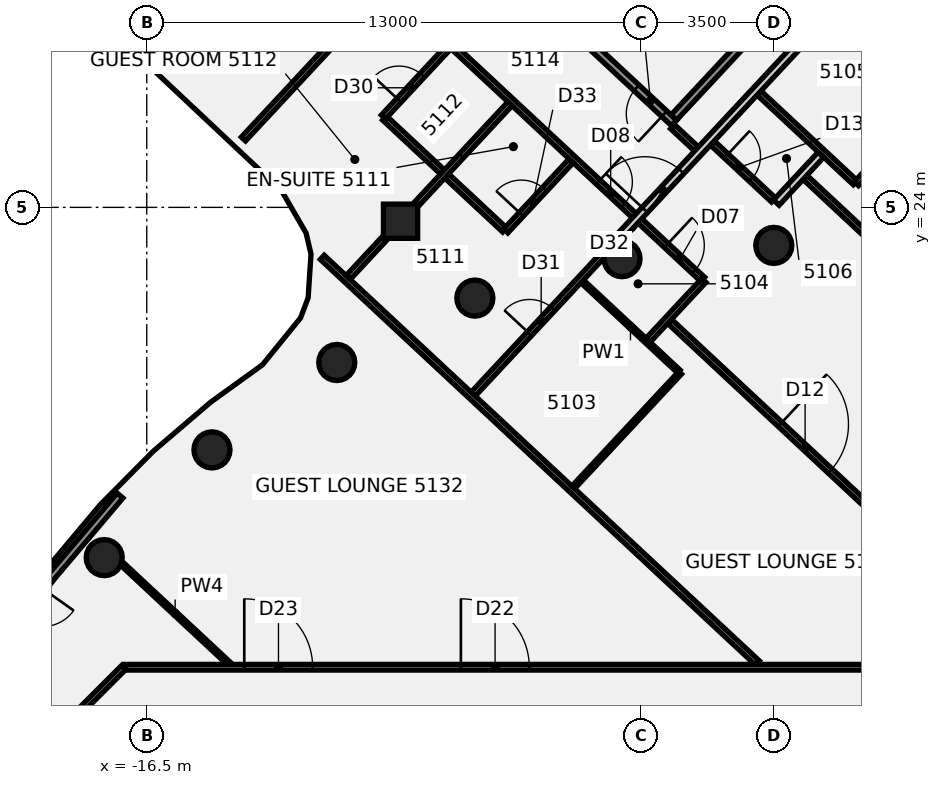
"""IFC4 building model, lengths in metres.
Left out: names, types, materials, properties, quantities, classifications, styles, units other than length and angle.
Written with IfcOpenShell. Run it as: python <this file> out.ifc"""

import sys

from ifc_helpers import new_model, si_unit, direction, frame, frame_2d, origin, origin_2d, place, context, subcontext, project, spatial, rectangle, circle, extrude, element, fill, save


model = new_model("IFC4")
c1 = context("Model", 3, precision=1e-05, world=origin(), true_north=direction((0.0, 1.0)))
c2 = subcontext(c1, "Body", "Model", "MODEL_VIEW")
j1 = project(units=[si_unit("LENGTHUNIT", "METRE"), si_unit("PLANEANGLEUNIT", "RADIAN")], contexts=[c1])
p1 = place(None, origin())
s1 = spatial("IfcSite", under=j1, at=p1, CompositionType="ELEMENT")
p2 = place(p1, origin())
s2 = spatial("IfcBuilding", under=s1, at=p2, CompositionType="ELEMENT")
p3 = place(p2, frame((0.0, 0.0, 204.1)))
s3 = spatial("IfcBuildingStorey", under=s2, at=p3, CompositionType="ELEMENT", Elevation=204.1)
for number, where, z_axis, x_axis in (
    (1, (0.0, 23.0, -0.14), (0.0, 0.0, 1.0), (1.0, 0.0, 0.0)),
    (2, (-3.994, 22.651, -0.14), (0.0, 0.0, 1.0), (1.0, 0.0, 0.0)),
    (3, (-7.866, 21.613, -0.14), (0.0, 0.0, 1.0), (1.0, 0.0, 0.0)),
    (4, (-11.5, 19.919, -0.14), (0.0, 0.0, 1.0), (1.0, 0.0, 0.0)),
    (5, (-14.784, 17.619, -0.14), (0.0, 0.0, 1.0), (1.0, 0.0, 0.0)),
    (6, (-17.619, 14.784, -0.14), (0.0, 0.0, 1.0), (1.0, 0.0, 0.0)),
):
    element("IfcColumn", number, at=place(p3, frame(where, z_axis=z_axis, x_axis=x_axis)), inside=s3, PredefinedType="COLUMN", context=c2, shape_type="SweptSolid", body=[
        extrude(circle(Radius=0.475, at=origin_2d()), origin(), (0.0, 0.0, 1.0), 3.6),
    ])
p4 = place(p3, frame((-9.822, 23.635, -0.139), z_axis=(-0.00779464519, -0.049750170171, 0.998731277208), x_axis=(0.681290927814, 0.730822792245, 0.041721912875)))
e7 = element("IfcColumn", 7, at=p4, inside=s3, PredefinedType="COLUMN", context=c2, shape_type="SweptSolid", body=[
    extrude(rectangle(XDim=0.9, YDim=0.9, at=origin_2d()), origin(), (0.0, 0.0, 1.0), 3.602),
])
p5 = place(p3, frame((-17.173, 14.639, 0.0), z_axis=(0.0, 0.0, 1.0), x_axis=(0.731508874243, -0.681831919833, 0.0)))
e8 = element("IfcWall", 8, at=p5, inside=s3, PredefinedType="PARTITIONING", context=c2, shape_type="SweptSolid", body=[
    extrude(rectangle(XDim=3.883, YDim=0.1, at=frame_2d((1.941, 0.0))), origin(), (0.0, 0.0, 1.0), 2.864),
])
p6 = place(p3, frame((-11.882, 22.685, 0.0), z_axis=(0.0, 0.0, 1.0), x_axis=(0.731545196646, -0.681792948969, 0.0)))
e9 = element("IfcWall", 9, at=p6, inside=s3, PredefinedType="PARTITIONING", context=c2, shape_type="SweptSolid", body=[
    extrude(rectangle(XDim=15.654, YDim=0.15, at=frame_2d((7.827, 0.0))), origin(), (0.0, 0.0, 1.0), 2.864),
])
p7 = place(p3, frame((-10.243, 26.352, 0.0), z_axis=(0.0, 0.0, 1.0), x_axis=(0.731425369859, -0.681921497187, 0.0)))
e10 = element("IfcWall", 10, at=p7, inside=s3, PredefinedType="PARTITIONING", context=c2, shape_type="SweptSolid", body=[
    extrude(rectangle(XDim=4.32, YDim=0.15, at=frame_2d((2.16, 0.0))), origin(), (0.0, 0.0, 1.0), 2.864),
])
p8 = place(p3, frame((-10.124, 29.794, 0.0), z_axis=(0.0, 0.0, 1.0), x_axis=(0.7316631589, -0.681666356738, 0.0)))
e11 = element("IfcWall", 11, at=p8, inside=s3, PredefinedType="PARTITIONING", context=c2, shape_type="SweptSolid", body=[
    extrude(rectangle(XDim=11.28, YDim=0.15, at=frame_2d((5.64, 0.0))), origin(), (0.0, 0.0, 1.0), 2.864),
])
p9 = place(p8, frame((9.97, 0.0, 0.0)))
e12 = element("IfcOpeningElement", 12, at=p9, cuts=e11, PredefinedType="OPENING", context=c2, shape_type="SweptSolid", body=[
    extrude(rectangle(XDim=1.0, YDim=2.1, at=frame_2d((0.5, 1.05))), frame((0.0, 0.085, 0.0), z_axis=(0.0, -1.0, 0.0), x_axis=(1.0, 0.0, 0.0)), (0.0, 0.0, 1.0), 0.17),
])
p10 = place(p8, frame((7.52, 0.0, 0.0)))
e13 = element("IfcOpeningElement", 13, at=p10, cuts=e11, PredefinedType="OPENING", context=c2, shape_type="SweptSolid", body=[
    extrude(rectangle(XDim=0.9, YDim=2.1, at=frame_2d((0.45, 1.05))), frame((0.0, 0.085, 0.0), z_axis=(0.0, -1.0, 0.0), x_axis=(1.0, 0.0, 0.0)), (0.0, 0.0, 1.0), 0.17),
])
p11 = place(p8, frame((0.82, 0.0, 0.0)))
e14 = element("IfcOpeningElement", 14, at=p11, cuts=e11, PredefinedType="OPENING", context=c2, shape_type="SweptSolid", body=[
    extrude(rectangle(XDim=0.9, YDim=2.1, at=frame_2d((0.45, 1.05))), frame((0.0, 0.085, 0.0), z_axis=(0.0, -1.0, 0.0), x_axis=(1.0, 0.0, 0.0)), (0.0, 0.0, 1.0), 0.17),
])
p12 = place(p3, frame((-2.664, 26.123, 0.0), z_axis=(0.0, 0.0, 1.0), x_axis=(0.731385767523, -0.68196397197, 0.0)))
e15 = element("IfcWall", 15, at=p12, inside=s3, PredefinedType="PARTITIONING", context=c2, shape_type="SweptSolid", body=[
    extrude(rectangle(XDim=0.86, YDim=0.15, at=frame_2d((0.43, 0.0))), origin(), (0.0, 0.0, 1.0), 2.864),
])
p13 = place(p3, frame((-5.043, 22.053, 0.0), z_axis=(0.0, 0.0, 1.0), x_axis=(0.731533911218, -0.681805057724, 0.0)))
e16 = element("IfcWall", 16, at=p13, inside=s3, PredefinedType="PARTITIONING", context=c2, shape_type="SweptSolid", body=[
    extrude(rectangle(XDim=3.476, YDim=0.1, at=frame_2d((1.738, 0.0))), origin(), (0.0, 0.0, 1.0), 2.864),
])
p14 = place(p3, frame((-2.739, 20.998, 0.0), z_axis=(0.0, 0.0, 1.0), x_axis=(0.731582971987, -0.681752414809, 0.0)))
e17 = element("IfcWall", 17, at=p14, inside=s3, PredefinedType="PARTITIONING", context=c2, shape_type="SweptSolid", body=[
    extrude(rectangle(XDim=13.179, YDim=0.15, at=frame_2d((6.59, 0.0))), origin(), (0.0, 0.0, 1.0), 2.864),
])
p15 = place(p14, frame((3.97, 0.0, 0.0)))
e18 = element("IfcOpeningElement", 18, at=p15, cuts=e17, PredefinedType="OPENING", context=c2, shape_type="SweptSolid", body=[
    extrude(rectangle(XDim=1.8, YDim=2.1, at=frame_2d((0.9, 1.05))), frame((0.0, 0.085, 0.0), z_axis=(0.0, -1.0, 0.0), x_axis=(1.0, 0.0, 0.0)), (0.0, 0.0, 1.0), 0.17),
])
p16 = place(p3, frame((-1.616, 25.693, 0.0), z_axis=(0.0, 0.0, 1.0), x_axis=(0.731635696516, -0.68169583216, 0.0)))
e19 = element("IfcWall", 19, at=p16, inside=s3, PredefinedType="PARTITIONING", context=c2, shape_type="SweptSolid", body=[
    extrude(rectangle(XDim=2.195, YDim=0.15, at=frame_2d((1.098, 0.0))), origin(), (0.0, 0.0, 1.0), 2.864),
])
p17 = place(p16, frame((0.5, 0.0, 0.0)))
e20 = element("IfcOpeningElement", 20, at=p17, cuts=e19, PredefinedType="OPENING", context=c2, shape_type="SweptSolid", body=[
    extrude(rectangle(XDim=0.9, YDim=2.1, at=frame_2d((0.45, 1.05))), frame((0.0, 0.085, 0.0), z_axis=(0.0, -1.0, 0.0), x_axis=(1.0, 0.0, 0.0)), (0.0, 0.0, 1.0), 0.17),
])
p18 = place(p3, frame((-0.389, 27.01, 0.0), z_axis=(0.0, 0.0, 1.0), x_axis=(0.731679144548, -0.681649198219, 0.0)))
e21 = element("IfcWall", 21, at=p18, inside=s3, PredefinedType="PARTITIONING", context=c2, shape_type="SweptSolid", body=[
    extrude(rectangle(XDim=3.46, YDim=0.15, at=frame_2d((1.73, 0.0))), origin(), (0.0, 0.0, 1.0), 2.864),
])
p19 = place(p3, frame((0.822, 24.789, 0.0), z_axis=(0.0, 0.0, 1.0), x_axis=(0.731510126667, -0.681830576158, 0.0)))
e22 = element("IfcWall", 22, at=p19, inside=s3, PredefinedType="PARTITIONING", context=c2, shape_type="SweptSolid", body=[
    extrude(rectangle(XDim=15.22, YDim=0.15, at=frame_2d((7.61, 0.0))), origin(), (0.0, 0.0, 1.0), 2.864),
])
p20 = place(p19, frame((9.35, 0.0, 0.0)))
e23 = element("IfcOpeningElement", 23, at=p20, cuts=e22, PredefinedType="OPENING", context=c2, shape_type="SweptSolid", body=[
    extrude(rectangle(XDim=0.9, YDim=2.1, at=frame_2d((0.45, 1.05))), frame((0.0, 0.085, 0.0), z_axis=(0.0, -1.0, 0.0), x_axis=(1.0, 0.0, 0.0)), (0.0, 0.0, 1.0), 0.17),
])
p21 = place(p3, frame((-17.065, 11.9, 0.0), z_axis=(0.0, 0.0, 1.0), x_axis=(1.0, 0.0, 0.0)))
e24 = element("IfcWall", 24, at=p21, inside=s3, PredefinedType="PARTITIONING", context=c2, shape_type="SweptSolid", body=[
    extrude(rectangle(XDim=34.165, YDim=0.15, at=frame_2d((17.083, 0.0))), origin(), (0.0, 0.0, 1.0), 2.864),
])
p22 = place(p21, frame((24.539, 0.0, 0.0)))
e25 = element("IfcOpeningElement", 25, at=p22, cuts=e24, PredefinedType="OPENING", context=c2, shape_type="SweptSolid", body=[
    extrude(rectangle(XDim=1.8, YDim=2.1, at=frame_2d((0.9, 1.05))), frame((0.0, 0.085, 0.0), z_axis=(0.0, -1.0, 0.0), x_axis=(1.0, 0.0, 0.0)), (0.0, 0.0, 1.0), 0.17),
])
p23 = place(p21, frame((8.831, 0.0, 0.0)))
e26 = element("IfcOpeningElement", 26, at=p23, cuts=e24, PredefinedType="OPENING", context=c2, shape_type="SweptSolid", body=[
    extrude(rectangle(XDim=1.8, YDim=2.1, at=frame_2d((0.9, 1.05))), frame((0.0, 0.085, 0.0), z_axis=(0.0, -1.0, 0.0), x_axis=(1.0, 0.0, 0.0)), (0.0, 0.0, 1.0), 0.17),
])
p24 = place(p21, frame((3.131, 0.0, 0.0)))
e27 = element("IfcOpeningElement", 27, at=p24, cuts=e24, PredefinedType="OPENING", context=c2, shape_type="SweptSolid", body=[
    extrude(rectangle(XDim=1.8, YDim=2.1, at=frame_2d((0.9, 1.05))), frame((0.0, 0.085, 0.0), z_axis=(0.0, -1.0, 0.0), x_axis=(1.0, 0.0, 0.0)), (0.0, 0.0, 1.0), 0.17),
])
p25 = place(p3, frame((-18.872, 10.128, 0.0), z_axis=(0.0, 0.0, 1.0), x_axis=(0.707106781187, 0.707106781187, 0.0)))
e28 = element("IfcWall", 28, at=p25, inside=s3, PredefinedType="PARTITIONING", context=c2, shape_type="SweptSolid", body=[
    extrude(rectangle(XDim=2.505, YDim=0.15, at=frame_2d((1.253, 0.0))), origin(), (0.0, 0.0, 1.0), 2.864),
])
p26 = place(p3, frame((-13.955, 25.8, 0.0), z_axis=(0.0, 0.0, 1.0), x_axis=(0.681742400868, 0.731592303717, 0.0)))
e29 = element("IfcWall", 29, at=p26, inside=s3, PredefinedType="PARTITIONING", context=c2, shape_type="SweptSolid", body=[
    extrude(rectangle(XDim=13.434, YDim=0.15, at=frame_2d((6.717, 0.0))), origin(), (0.0, 0.0, 1.0), 2.864),
])
p27 = place(p26, frame((5.835, 0.0, 0.0)))
e30 = element("IfcOpeningElement", 30, at=p27, cuts=e29, PredefinedType="OPENING", context=c2, shape_type="SweptSolid", body=[
    extrude(rectangle(XDim=1.8, YDim=2.1, at=frame_2d((0.9, 1.05))), frame((0.0, 0.085, 0.0), z_axis=(0.0, -1.0, 0.0), x_axis=(1.0, 0.0, 0.0)), (0.0, 0.0, 1.0), 0.17),
])
p28 = place(p3, frame((-11.198, 22.157, 0.0), z_axis=(0.0, 0.0, 1.0), x_axis=(0.681641624931, 0.731686199926, 0.0)))
e31 = element("IfcWall", 31, at=p28, inside=s3, PredefinedType="PARTITIONING", context=c2, shape_type="SweptSolid", body=[
    extrude(rectangle(XDim=1.415, YDim=0.15, at=frame_2d((0.708, 0.0))), origin(), (0.0, 0.0, 1.0), 2.864),
])
p29 = place(p3, frame((-9.509, 23.971, 0.0), z_axis=(0.0, 0.0, 1.0), x_axis=(0.681677436303, 0.731652836279, 0.0)))
e32 = element("IfcWall", 32, at=p29, inside=s3, PredefinedType="PARTITIONING", context=c2, shape_type="SweptSolid", body=[
    extrude(rectangle(XDim=3.762, YDim=0.15, at=frame_2d((1.881, 0.0))), origin(), (0.0, 0.0, 1.0), 2.864),
])
p30 = place(p3, frame((-10.272, 26.379, 0.0), z_axis=(0.0, 0.0, 1.0), x_axis=(0.681872886732, 0.731470687273, 0.0)))
e33 = element("IfcWall", 33, at=p30, inside=s3, PredefinedType="PARTITIONING", context=c2, shape_type="SweptSolid", body=[
    extrude(rectangle(XDim=2.52, YDim=0.15, at=frame_2d((1.26, 0.0))), origin(), (0.0, 0.0, 1.0), 2.864),
])
p31 = place(p30, frame((0.6, 0.0, 0.0)))
e34 = element("IfcOpeningElement", 34, at=p31, cuts=e33, PredefinedType="OPENING", context=c2, shape_type="SweptSolid", body=[
    extrude(rectangle(XDim=0.9, YDim=2.1, at=frame_2d((0.45, 1.05))), frame((0.0, 0.085, 0.0), z_axis=(0.0, -1.0, 0.0), x_axis=(1.0, 0.0, 0.0)), (0.0, 0.0, 1.0), 0.17),
])
p32 = place(p3, frame((-7.907, 19.09, 0.0), z_axis=(0.0, 0.0, 1.0), x_axis=(0.681793812983, 0.731544391393, 0.0)))
e35 = element("IfcWall", 35, at=p32, inside=s3, PredefinedType="PARTITIONING", context=c2, shape_type="SweptSolid", body=[
    extrude(rectangle(XDim=5.094, YDim=0.15, at=frame_2d((2.547, 0.0))), origin(), (0.0, 0.0, 1.0), 2.864),
])
p33 = place(p32, frame((2.17, 0.0, 0.0)))
e36 = element("IfcOpeningElement", 36, at=p33, cuts=e35, PredefinedType="OPENING", context=c2, shape_type="SweptSolid", body=[
    extrude(rectangle(XDim=0.9, YDim=2.1, at=frame_2d((0.45, 1.05))), frame((0.0, 0.085, 0.0), z_axis=(0.0, -1.0, 0.0), x_axis=(1.0, 0.0, 0.0)), (0.0, 0.0, 1.0), 0.17),
])
p34 = place(p3, frame((-4.184, 23.085, 0.0), z_axis=(0.0, 0.0, 1.0), x_axis=(0.68178968738, 0.731548236402, 0.0)))
e37 = element("IfcWall", 37, at=p34, inside=s3, PredefinedType="PARTITIONING", context=c2, shape_type="SweptSolid", body=[
    extrude(rectangle(XDim=8.758, YDim=0.2, at=frame_2d((4.379, 0.0))), origin(), (0.0, 0.0, 1.0), 2.864),
])
p35 = place(p34, frame((1.159, 0.0, 0.0)))
e38 = element("IfcOpeningElement", 38, at=p35, cuts=e37, PredefinedType="OPENING", context=c2, shape_type="SweptSolid", body=[
    extrude(rectangle(XDim=1.4, YDim=2.1, at=frame_2d((0.7, 1.05))), frame((0.0, 0.11, 0.0), z_axis=(0.0, -1.0, 0.0), x_axis=(1.0, 0.0, 0.0)), (0.0, 0.0, 1.0), 0.22),
])
p36 = place(p3, frame((-7.053, 23.379, 0.0), z_axis=(0.0, 0.0, 1.0), x_axis=(0.68166548211, 0.731663973761, 0.0)))
e39 = element("IfcWall", 39, at=p36, inside=s3, PredefinedType="PARTITIONING", context=c2, shape_type="SweptSolid", body=[
    extrude(rectangle(XDim=2.52, YDim=0.15, at=frame_2d((1.26, 0.0))), origin(), (0.0, 0.0, 1.0), 2.864),
])
p37 = place(p36, frame((0.6, 0.0, 0.0)))
e40 = element("IfcOpeningElement", 40, at=p37, cuts=e39, PredefinedType="OPENING", context=c2, shape_type="SweptSolid", body=[
    extrude(rectangle(XDim=0.9, YDim=2.1, at=frame_2d((0.45, 1.05))), frame((0.0, 0.085, 0.0), z_axis=(0.0, -1.0, 0.0), x_axis=(1.0, 0.0, 0.0)), (0.0, 0.0, 1.0), 0.17),
])
p38 = place(p3, frame((-5.277, 16.632, 0.0), z_axis=(0.0, 0.0, 1.0), x_axis=(0.681902700844, 0.731442893589, 0.0)))
e41 = element("IfcWall", 41, at=p38, inside=s3, PredefinedType="PARTITIONING", context=c2, shape_type="SweptSolid", body=[
    extrude(rectangle(XDim=4.125, YDim=0.1, at=frame_2d((2.062, 0.0))), origin(), (0.0, 0.0, 1.0), 2.864),
])
p39 = place(p3, frame((2.173, 24.623, 0.0), z_axis=(0.0, 0.0, 1.0), x_axis=(0.681904871808, 0.731440869657, 0.0)))
e42 = element("IfcWall", 42, at=p39, inside=s3, PredefinedType="PARTITIONING", context=c2, shape_type="SweptSolid", body=[
    extrude(rectangle(XDim=2.799, YDim=0.15, at=frame_2d((1.4, 0.0))), origin(), (0.0, 0.0, 1.0), 2.864),
])
p40 = place(p39, frame((1.2, 0.0, 0.0)))
e43 = element("IfcOpeningElement", 43, at=p40, cuts=e42, PredefinedType="OPENING", context=c2, shape_type="SweptSolid", body=[
    extrude(rectangle(XDim=0.9, YDim=2.1, at=frame_2d((0.45, 1.05))), frame((0.0, 0.085, 0.0), z_axis=(0.0, -1.0, 0.0), x_axis=(1.0, 0.0, 0.0)), (0.0, 0.0, 1.0), 0.17),
])
p41 = place(p3, frame((-3.301, 20.511, 0.0), z_axis=(0.0, 0.0, 1.0), x_axis=(0.681683968941, 0.731646749797, 0.0)))
e44 = element("IfcWall", 44, at=p41, inside=s3, PredefinedType="PARTITIONING", context=c2, shape_type="SweptSolid", body=[
    extrude(rectangle(XDim=2.14, YDim=0.15, at=frame_2d((1.07, 0.0))), origin(), (0.0, 0.0, 1.0), 2.864),
])
p42 = place(p3, frame((0.066, 24.125, 0.0), z_axis=(0.0, 0.0, 1.0), x_axis=(0.681609901537, 0.731715752275, 0.0)))
e45 = element("IfcWall", 45, at=p42, inside=s3, PredefinedType="PARTITIONING", context=c2, shape_type="SweptSolid", body=[
    extrude(rectangle(XDim=1.72, YDim=0.2, at=frame_2d((0.86, 0.0))), origin(), (0.0, 0.0, 1.0), 2.864),
])
p43 = place(p3, frame((-17.204, 16.417, 0.0), z_axis=(0.0, 0.0, 1.0), x_axis=(-0.645983966585, -0.763350977543, 0.0)))
e46 = element("IfcWall", 46, at=p43, inside=s3, PredefinedType="SOLIDWALL", context=c2, shape_type="SweptSolid", body=[
    extrude(rectangle(XDim=2.885, YDim=0.2, at=frame_2d((1.443, 0.0))), origin(), (0.0, 0.0, 1.0), 3.46),
])
p44 = place(p3, frame((-19.067, 14.215, 0.0), z_axis=(0.0, 0.0, 1.0), x_axis=(-0.57647949336, -0.817111616449, 0.0)))
e47 = element("IfcWall", 47, at=p44, inside=s3, PredefinedType="SOLIDWALL", context=c2, shape_type="SweptSolid", body=[
    extrude(rectangle(XDim=1.6, YDim=0.2, at=frame_2d((0.8, 0.0))), origin(), (0.0, 0.0, 1.0), 3.46),
])
p45 = place(p44, frame((0.3, 0.0, 0.0)))
e48 = element("IfcOpeningElement", 48, at=p45, cuts=e47, PredefinedType="OPENING", context=c2, shape_type="SweptSolid", body=[
    extrude(rectangle(XDim=1.0, YDim=2.4, at=frame_2d((0.5, 1.2))), frame((0.0, 0.11, 0.0), z_axis=(0.0, -1.0, 0.0), x_axis=(1.0, 0.0, 0.0)), (0.0, 0.0, 1.0), 0.22),
])
p46 = place(p3, frame((-2.625, 26.224, -0.14), z_axis=(0.0, 0.0, 1.0), x_axis=(-0.731556739466, 0.681780563629, 0.0)))
e49 = element("IfcWall", 49, at=p46, inside=s3, PredefinedType="SHEAR", context=c2, shape_type="SweptSolid", body=[
    extrude(rectangle(XDim=6.7, YDim=0.2, at=frame_2d((3.35, 0.0))), origin(), (0.0, 0.0, 1.0), 3.004),
])
p47 = place(p46, frame((0.35, 0.0, 0.0)))
e50 = element("IfcOpeningElement", 50, at=p47, cuts=e49, PredefinedType="OPENING", context=c2, shape_type="SweptSolid", body=[
    extrude(rectangle(XDim=1.0, YDim=2.1, at=frame_2d((0.5, 1.05))), frame((0.0, 0.11, 0.0), z_axis=(0.0, -1.0, 0.0), x_axis=(1.0, 0.0, 0.0)), (0.0, 0.0, 1.0), 0.22),
])
p48 = place(p3, frame((-0.448, 28.706, -0.14), z_axis=(0.0, 0.0, 1.0), x_axis=(-0.681836962864, -0.731504173653, 0.0)))
e51 = element("IfcWall", 51, at=p48, inside=s3, PredefinedType="SHEAR", context=c2, shape_type="SweptSolid", body=[
    extrude(rectangle(XDim=3.2, YDim=0.2, at=frame_2d((1.6, 0.0))), origin(), (0.0, 0.0, 1.0), 3.004),
])
p49 = place(p9, frame((1.0, 0.0, 0.0), z_axis=(0.0, 0.0, 1.0), x_axis=(-1.0, 0.0, 0.0)))
e52 = element("IfcDoor", 52, at=p49, inside=s3, OperationType="SINGLE_SWING_RIGHT", PredefinedType="DOOR", context=c2, shape_type="SweptSolid", body=[
    extrude(rectangle(XDim=1.0, YDim=2.1, at=frame_2d((0.5, 1.05))), frame((0.0, 0.025, 0.0), z_axis=(0.0, -1.0, 0.0), x_axis=(1.0, 0.0, 0.0)), (0.0, 0.0, 1.0), 0.05),
])
fill(e12, e52)
p50 = place(p10, frame((0.9, 0.0, 0.0), z_axis=(0.0, 0.0, 1.0), x_axis=(-1.0, 0.0, 0.0)))
e53 = element("IfcDoor", 53, at=p50, inside=s3, OperationType="SINGLE_SWING_RIGHT", PredefinedType="DOOR", context=c2, shape_type="SweptSolid", body=[
    extrude(rectangle(XDim=0.9, YDim=2.1, at=frame_2d((0.45, 1.05))), frame((0.0, 0.025, 0.0), z_axis=(0.0, -1.0, 0.0), x_axis=(1.0, 0.0, 0.0)), (0.0, 0.0, 1.0), 0.05),
])
fill(e13, e53)
p51 = place(p15, frame((1.8, 0.0, 0.0), z_axis=(0.0, 0.0, 1.0), x_axis=(-1.0, 0.0, 0.0)))
e54 = element("IfcDoor", 54, at=p51, inside=s3, OperationType="DOUBLE_DOOR_SINGLE_SWING", PredefinedType="DOOR", context=c2, shape_type="SweptSolid", body=[
    extrude(rectangle(XDim=1.8, YDim=2.1, at=frame_2d((0.9, 1.05))), frame((0.0, 0.025, 0.0), z_axis=(0.0, -1.0, 0.0), x_axis=(1.0, 0.0, 0.0)), (0.0, 0.0, 1.0), 0.05),
])
fill(e18, e54)
p52 = place(p17, origin())
e55 = element("IfcDoor", 55, at=p52, inside=s3, OperationType="SINGLE_SWING_RIGHT", PredefinedType="DOOR", context=c2, shape_type="SweptSolid", body=[
    extrude(rectangle(XDim=0.9, YDim=2.1, at=frame_2d((0.45, 1.05))), frame((0.0, 0.025, 0.0), z_axis=(0.0, -1.0, 0.0), x_axis=(1.0, 0.0, 0.0)), (0.0, 0.0, 1.0), 0.05),
])
fill(e20, e55)
p53 = place(p23, origin())
e56 = element("IfcDoor", 56, at=p53, inside=s3, OperationType="DOUBLE_DOOR_SINGLE_SWING", PredefinedType="DOOR", context=c2, shape_type="SweptSolid", body=[
    extrude(rectangle(XDim=1.8, YDim=2.1, at=frame_2d((0.9, 1.05))), frame((0.0, 0.025, 0.0), z_axis=(0.0, -1.0, 0.0), x_axis=(1.0, 0.0, 0.0)), (0.0, 0.0, 1.0), 0.05),
])
fill(e26, e56)
p54 = place(p24, origin())
e57 = element("IfcDoor", 57, at=p54, inside=s3, OperationType="DOUBLE_DOOR_SINGLE_SWING", PredefinedType="DOOR", context=c2, shape_type="SweptSolid", body=[
    extrude(rectangle(XDim=1.8, YDim=2.1, at=frame_2d((0.9, 1.05))), frame((0.0, 0.025, 0.0), z_axis=(0.0, -1.0, 0.0), x_axis=(1.0, 0.0, 0.0)), (0.0, 0.0, 1.0), 0.05),
])
fill(e27, e57)
p55 = place(p31, frame((0.9, 0.0, 0.0), z_axis=(0.0, 0.0, 1.0), x_axis=(-1.0, 0.0, 0.0)))
e58 = element("IfcDoor", 58, at=p55, inside=s3, OperationType="SINGLE_SWING_LEFT", PredefinedType="DOOR", context=c2, shape_type="SweptSolid", body=[
    extrude(rectangle(XDim=0.9, YDim=2.1, at=frame_2d((0.45, 1.05))), frame((0.0, 0.025, 0.0), z_axis=(0.0, -1.0, 0.0), x_axis=(1.0, 0.0, 0.0)), (0.0, 0.0, 1.0), 0.05),
])
fill(e34, e58)
p56 = place(p33, frame((0.9, 0.0, 0.0), z_axis=(0.0, 0.0, 1.0), x_axis=(-1.0, 0.0, 0.0)))
e59 = element("IfcDoor", 59, at=p56, inside=s3, OperationType="SINGLE_SWING_RIGHT", PredefinedType="DOOR", context=c2, shape_type="SweptSolid", body=[
    extrude(rectangle(XDim=0.9, YDim=2.1, at=frame_2d((0.45, 1.05))), frame((0.0, 0.025, 0.0), z_axis=(0.0, -1.0, 0.0), x_axis=(1.0, 0.0, 0.0)), (0.0, 0.0, 1.0), 0.05),
])
fill(e36, e59)
p57 = place(p35, frame((1.4, 0.0, 0.0), z_axis=(0.0, 0.0, 1.0), x_axis=(-1.0, 0.0, 0.0)))
e60 = element("IfcDoor", 60, at=p57, inside=s3, OperationType="DOUBLE_DOOR_SINGLE_SWING", PredefinedType="DOOR", context=c2, shape_type="SweptSolid", body=[
    extrude(rectangle(XDim=1.4, YDim=2.1, at=frame_2d((0.7, 1.05))), frame((0.0, 0.025, 0.0), z_axis=(0.0, -1.0, 0.0), x_axis=(1.0, 0.0, 0.0)), (0.0, 0.0, 1.0), 0.05),
])
fill(e38, e60)
p58 = place(p37, origin())
e61 = element("IfcDoor", 61, at=p58, inside=s3, OperationType="SINGLE_SWING_RIGHT", PredefinedType="DOOR", context=c2, shape_type="SweptSolid", body=[
    extrude(rectangle(XDim=0.9, YDim=2.1, at=frame_2d((0.45, 1.05))), frame((0.0, 0.025, 0.0), z_axis=(0.0, -1.0, 0.0), x_axis=(1.0, 0.0, 0.0)), (0.0, 0.0, 1.0), 0.05),
])
fill(e40, e61)
p59 = place(p47, origin())
e62 = element("IfcDoor", 62, at=p59, inside=s3, OperationType="SINGLE_SWING_LEFT", PredefinedType="DOOR", context=c2, shape_type="SweptSolid", body=[
    extrude(rectangle(XDim=1.0, YDim=2.1, at=frame_2d((0.5, 1.05))), frame((0.0, 0.025, 0.0), z_axis=(0.0, -1.0, 0.0), x_axis=(1.0, 0.0, 0.0)), (0.0, 0.0, 1.0), 0.05),
])
fill(e50, e62)
save(model, sys.argv[1])
